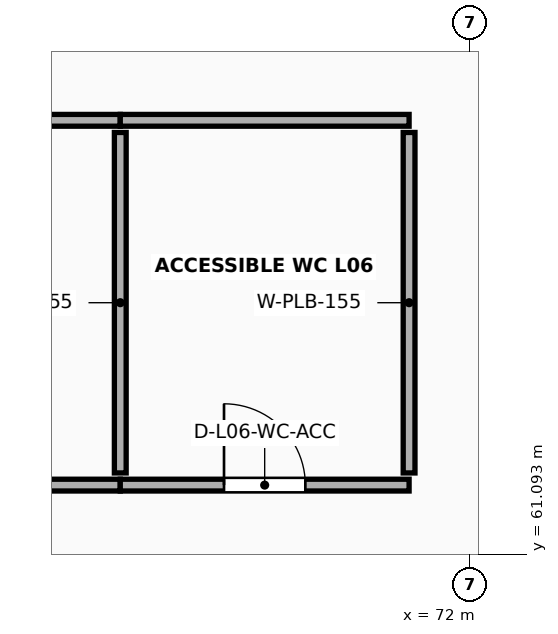
"""IFC4 building model, lengths in metres.
Left out: names, types, materials, properties, quantities, classifications, styles, units other than length and angle.
Written with IfcOpenShell. Run it as: python <this file> out.ifc"""

import sys

from ifc_helpers import new_model, si_unit, direction, frame, frame_2d, origin, place, context, subcontext, project, spatial, rectangle, extrude, element, fill, save


model = new_model("IFC4")
c1 = context("Model", 3, precision=1e-05, world=origin(), true_north=direction((0.0, 1.0)))
c2 = subcontext(c1, "Body", "Model", "MODEL_VIEW")
j1 = project(units=[si_unit("LENGTHUNIT", "METRE"), si_unit("PLANEANGLEUNIT", "RADIAN")], contexts=[c1])
p1 = place(None, origin())
s1 = spatial("IfcSite", under=j1, at=p1, CompositionType="ELEMENT")
p2 = place(p1, origin())
s2 = spatial("IfcBuilding", under=s1, at=p2, CompositionType="ELEMENT")
p3 = place(p2, frame((0.0, 0.0, 24.8)))
s3 = spatial("IfcBuildingStorey", under=s2, at=p3, CompositionType="ELEMENT", Elevation=24.8)
p4 = place(p3, frame((62.0, 62.0, 0.0), z_axis=(0.0, 0.0, 1.0), x_axis=(1.0, 0.0, 0.0)))
e1 = element("IfcWall", 1, at=p4, inside=s3, PredefinedType="PLUMBINGWALL", context=c2, shape_type="SweptSolid", body=[
    extrude(rectangle(XDim=5.4, YDim=0.155, at=frame_2d((2.7, 0.0))), origin(), (0.0, 0.0, 1.0), 2.75),
])
p5 = place(p4, frame((2.185, 0.0, 0.0)))
e2 = element("IfcOpeningElement", 2, at=p5, cuts=e1, PredefinedType="OPENING", context=c2, shape_type="SweptSolid", body=[
    extrude(rectangle(XDim=1.03, YDim=2.17, at=frame_2d((0.515, 1.085))), frame((0.0, 0.093, 0.0), z_axis=(0.0, -1.0, 0.0), x_axis=(1.0, 0.0, 0.0)), (0.0, 0.0, 1.0), 0.185),
])
p6 = place(p3, frame((62.0, 66.8, 0.0), z_axis=(0.0, 0.0, 1.0), x_axis=(1.0, 0.0, 0.0)))
e3 = element("IfcWall", 3, at=p6, inside=s3, PredefinedType="PLUMBINGWALL", context=c2, shape_type="SweptSolid", body=[
    extrude(rectangle(XDim=5.4, YDim=0.155, at=frame_2d((2.7, 0.0))), origin(), (0.0, 0.0, 1.0), 2.75),
])
p7 = place(p3, frame((67.4, 62.16, 0.0), z_axis=(0.0, 0.0, 1.0), x_axis=(0.0, 1.0, 0.0)))
e4 = element("IfcWall", 4, at=p7, inside=s3, PredefinedType="PLUMBINGWALL", context=c2, shape_type="SweptSolid", body=[
    extrude(rectangle(XDim=4.48, YDim=0.155, at=frame_2d((2.24, 0.0))), origin(), (0.0, 0.0, 1.0), 2.75),
])
p8 = place(p3, frame((67.4, 62.0, 0.0), z_axis=(0.0, 0.0, 1.0), x_axis=(1.0, 0.0, 0.0)))
e5 = element("IfcWall", 5, at=p8, inside=s3, PredefinedType="PLUMBINGWALL", context=c2, shape_type="SweptSolid", body=[
    extrude(rectangle(XDim=3.8, YDim=0.155, at=frame_2d((1.9, 0.0))), origin(), (0.0, 0.0, 1.0), 2.75),
])
p9 = place(p8, frame((1.365, 0.0, 0.0)))
e6 = element("IfcOpeningElement", 6, at=p9, cuts=e5, PredefinedType="OPENING", context=c2, shape_type="SweptSolid", body=[
    extrude(rectangle(XDim=1.07, YDim=2.19, at=frame_2d((0.535, 1.095))), frame((0.0, 0.093, 0.0), z_axis=(0.0, -1.0, 0.0), x_axis=(1.0, 0.0, 0.0)), (0.0, 0.0, 1.0), 0.185),
])
p10 = place(p3, frame((67.4, 66.8, 0.0), z_axis=(0.0, 0.0, 1.0), x_axis=(1.0, 0.0, 0.0)))
e7 = element("IfcWall", 7, at=p10, inside=s3, PredefinedType="PLUMBINGWALL", context=c2, shape_type="SweptSolid", body=[
    extrude(rectangle(XDim=3.8, YDim=0.155, at=frame_2d((1.9, 0.0))), origin(), (0.0, 0.0, 1.0), 2.75),
])
p11 = place(p3, frame((71.2, 62.16, 0.0), z_axis=(0.0, 0.0, 1.0), x_axis=(0.0, 1.0, 0.0)))
e8 = element("IfcWall", 8, at=p11, inside=s3, PredefinedType="PLUMBINGWALL", context=c2, shape_type="SweptSolid", body=[
    extrude(rectangle(XDim=4.48, YDim=0.155, at=frame_2d((2.24, 0.0))), origin(), (0.0, 0.0, 1.0), 2.75),
])
p12 = place(p9, origin())
e9 = element("IfcDoor", 9, at=p12, inside=s3, OperationType="SINGLE_SWING_LEFT", PredefinedType="DOOR", context=c2, shape_type="SweptSolid", body=[
    extrude(rectangle(XDim=1.07, YDim=2.19, at=frame_2d((0.535, 1.095))), frame((0.0, 0.025, 0.0), z_axis=(0.0, -1.0, 0.0), x_axis=(1.0, 0.0, 0.0)), (0.0, 0.0, 1.0), 0.05),
])
fill(e6, e9)
save(model, sys.argv[1])
